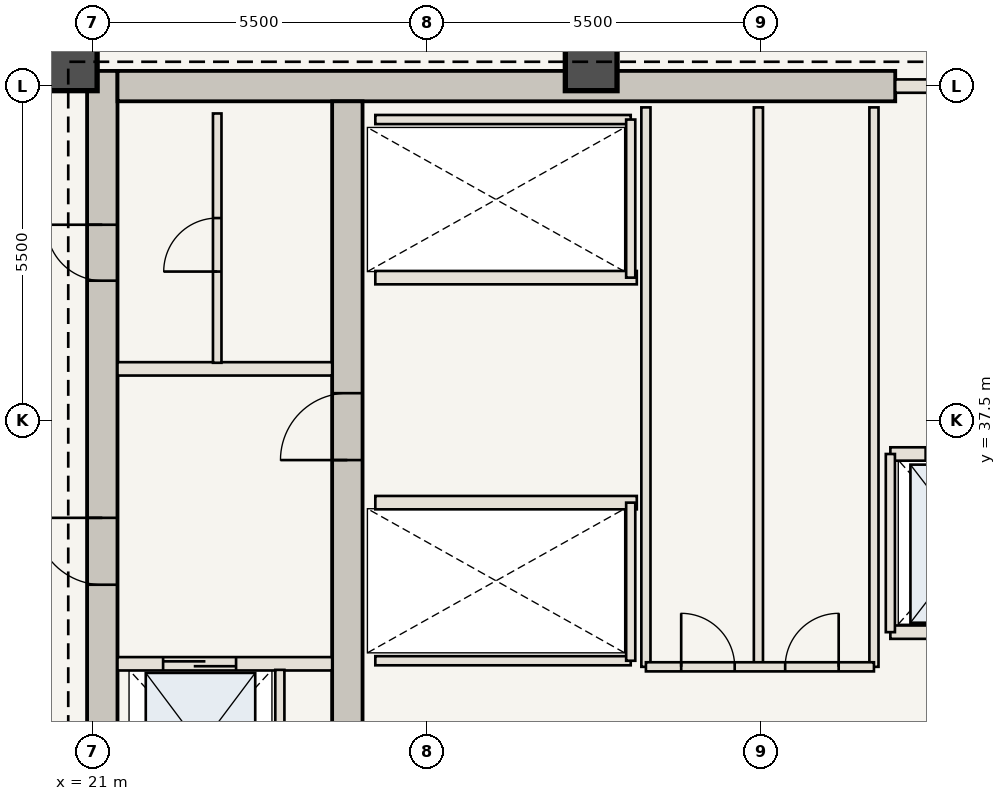
"""IFC4 building model, lengths in metres.
Left out: names, types, materials, properties, quantities, classifications, styles, units other than length and angle.
Written with IfcOpenShell. Run it as: python <this file> out.ifc"""

import sys

from ifc_helpers import new_model, si_unit, direction, frame, frame_2d, origin, origin_2d, place, context, subcontext, project, spatial, rectangle, extrude, element, fill, save


model = new_model("IFC4")
c1 = context("Model", 3, precision=1e-05, world=origin(), true_north=direction((0.0, 1.0)))
c2 = subcontext(c1, "Body", "Model", "MODEL_VIEW")
j1 = project(units=[si_unit("LENGTHUNIT", "METRE"), si_unit("PLANEANGLEUNIT", "RADIAN")], contexts=[c1])
p1 = place(None, origin())
s1 = spatial("IfcSite", under=j1, at=p1, CompositionType="ELEMENT")
p2 = place(p1, origin())
s2 = spatial("IfcBuilding", under=s1, at=p2, CompositionType="ELEMENT")
p3 = place(p2, frame((0.0, 0.0, 202.3)))
s3 = spatial("IfcBuildingStorey", under=s2, at=p3, CompositionType="ELEMENT", Elevation=202.3)
p4 = place(p3, frame((21.16, 30.6, 0.0), z_axis=(0.0, 0.0, 1.0), x_axis=(0.0, 1.0, 0.0)))
e1 = element("IfcWall", 1, at=p4, inside=s3, PredefinedType="SHEAR", context=c2, shape_type="SweptSolid", body=[
    extrude(rectangle(XDim=12.65, YDim=0.5, at=frame_2d((6.325, 0.0))), origin(), (0.0, 0.0, 1.0), 3.85),
])
p5 = place(p4, frame((4.2, 0.0, 0.0)))
e2 = element("IfcOpeningElement", 2, at=p5, cuts=e1, PredefinedType="OPENING", context=c2, shape_type="SweptSolid", body=[
    extrude(rectangle(XDim=1.1, YDim=2.15, at=frame_2d((0.55, 1.075))), frame((0.0, 0.26, 0.0), z_axis=(0.0, -1.0, 0.0), x_axis=(1.0, 0.0, 0.0)), (0.0, 0.0, 1.0), 0.52),
])
p6 = place(p4, frame((9.2, 0.0, 0.0)))
e3 = element("IfcOpeningElement", 3, at=p6, cuts=e1, PredefinedType="OPENING", context=c2, shape_type="SweptSolid", body=[
    extrude(rectangle(XDim=0.92, YDim=2.1, at=frame_2d((0.46, 1.05))), frame((0.0, 0.26, 0.0), z_axis=(0.0, -1.0, 0.0), x_axis=(1.0, 0.0, 0.0)), (0.0, 0.0, 1.0), 0.52),
])
p7 = place(p3, frame((21.41, 43.0, 0.0), z_axis=(0.0, 0.0, 1.0), x_axis=(1.0, 0.0, 0.0)))
e4 = element("IfcWall", 4, at=p7, inside=s3, PredefinedType="SHEAR", context=c2, shape_type="SweptSolid", body=[
    extrude(rectangle(XDim=12.79, YDim=0.5, at=frame_2d((6.395, 0.0))), origin(), (0.0, 0.0, 1.0), 3.85),
])
p8 = place(p3, frame((25.19, 30.6, 0.0), z_axis=(0.0, 0.0, 1.0), x_axis=(0.0, 1.0, 0.0)))
e5 = element("IfcWall", 5, at=p8, inside=s3, PredefinedType="SHEAR", context=c2, shape_type="SweptSolid", body=[
    extrude(rectangle(XDim=12.15, YDim=0.5, at=frame_2d((6.075, 0.0))), origin(), (0.0, 0.0, 1.0), 3.85),
])
p9 = place(p8, frame((6.25, 0.0, 0.0)))
e6 = element("IfcOpeningElement", 6, at=p9, cuts=e5, PredefinedType="OPENING", context=c2, shape_type="SweptSolid", body=[
    extrude(rectangle(XDim=1.1, YDim=2.15, at=frame_2d((0.55, 1.075))), frame((0.0, 0.26, 0.0), z_axis=(0.0, -1.0, 0.0), x_axis=(1.0, 0.0, 0.0)), (0.0, 0.0, 1.0), 0.52),
])
for number, where, z_axis, x_axis in (
    (7, (29.2, 43.35, 0.0), (0.0, 0.0, 1.0), (1.0, 0.0, 0.0)),
    (8, (20.65, 43.35, 0.0), (0.0, 0.0, 1.0), (1.0, 0.0, 0.0)),
):
    element("IfcColumn", number, at=place(p3, frame(where, z_axis=z_axis, x_axis=x_axis)), inside=s3, PredefinedType="COLUMN", context=c2, shape_type="SweptSolid", body=[
        extrude(rectangle(XDim=0.85, YDim=0.85, at=origin_2d()), origin(), (0.0, 0.0, 1.0), 3.85),
    ])
p10 = place(p3, frame((21.41, 33.5, 0.0), z_axis=(0.0, 0.0, 1.0), x_axis=(1.0, 0.0, 0.0)))
e9 = element("IfcWall", 9, at=p10, inside=s3, PredefinedType="STANDARD", context=c2, shape_type="SweptSolid", body=[
    extrude(rectangle(XDim=3.53, YDim=0.22, at=frame_2d((1.765, 0.0))), origin(), (0.0, 0.0, 1.0), 3.685),
])
p11 = place(p10, frame((0.75, 0.0, 0.0)))
e10 = element("IfcOpeningElement", 10, at=p11, cuts=e9, PredefinedType="OPENING", context=c2, shape_type="SweptSolid", body=[
    extrude(rectangle(XDim=1.2, YDim=2.2, at=frame_2d((0.6, 1.1))), frame((0.0, 0.12, 0.0), z_axis=(0.0, -1.0, 0.0), x_axis=(1.0, 0.0, 0.0)), (0.0, 0.0, 1.0), 0.24),
])
p12 = place(p3, frame((24.08, 30.75, 0.0), z_axis=(0.0, 0.0, 1.0), x_axis=(0.0, 1.0, 0.0)))
e11 = element("IfcWall", 11, at=p12, inside=s3, PredefinedType="STANDARD", context=c2, shape_type="SweptSolid", body=[
    extrude(rectangle(XDim=2.65, YDim=0.15, at=frame_2d((1.325, 0.0))), origin(), (0.0, 0.0, 1.0), 3.685),
])
p13 = place(p3, frame((21.41, 38.35, 0.0), z_axis=(0.0, 0.0, 1.0), x_axis=(1.0, 0.0, 0.0)))
e12 = element("IfcWall", 12, at=p13, inside=s3, PredefinedType="STANDARD", context=c2, shape_type="SweptSolid", body=[
    extrude(rectangle(XDim=3.53, YDim=0.22, at=frame_2d((1.765, 0.0))), origin(), (0.0, 0.0, 1.0), 3.685),
])
p14 = place(p3, frame((23.05, 38.45, 0.0), z_axis=(0.0, 0.0, 1.0), x_axis=(0.0, 1.0, 0.0)))
e13 = element("IfcWall", 13, at=p14, inside=s3, PredefinedType="STANDARD", context=c2, shape_type="SweptSolid", body=[
    extrude(rectangle(XDim=4.1, YDim=0.14, at=frame_2d((2.05, 0.0))), origin(), (0.0, 0.0, 1.0), 3.685),
])
p15 = place(p14, frame((1.5, 0.0, 0.0)))
e14 = element("IfcOpeningElement", 14, at=p15, cuts=e13, PredefinedType="OPENING", context=c2, shape_type="SweptSolid", body=[
    extrude(rectangle(XDim=0.88, YDim=2.1, at=frame_2d((0.44, 1.05))), frame((0.0, 0.08, 0.0), z_axis=(0.0, -1.0, 0.0), x_axis=(1.0, 0.0, 0.0)), (0.0, 0.0, 1.0), 0.16),
])
p16 = place(p3, frame((25.65, 36.15, 0.0), z_axis=(0.0, 0.0, 1.0), x_axis=(1.0, 0.0, 0.0)))
e15 = element("IfcWall", 15, at=p16, inside=s3, PredefinedType="STANDARD", context=c2, shape_type="SweptSolid", body=[
    extrude(rectangle(XDim=4.3, YDim=0.22, at=frame_2d((2.15, 0.0))), origin(), (0.0, 0.0, 1.0), 3.685),
])
p17 = place(p3, frame((25.65, 33.55, 0.0), z_axis=(0.0, 0.0, 1.0), x_axis=(1.0, 0.0, 0.0)))
e16 = element("IfcWall", 16, at=p17, inside=s3, PredefinedType="STANDARD", context=c2, shape_type="SweptSolid", body=[
    extrude(rectangle(XDim=4.2, YDim=0.15, at=frame_2d((2.1, 0.0))), origin(), (0.0, 0.0, 1.0), 3.685),
])
p18 = place(p3, frame((29.85, 33.55, 0.0), z_axis=(0.0, 0.0, 1.0), x_axis=(0.0, 1.0, 0.0)))
e17 = element("IfcWall", 17, at=p18, inside=s3, PredefinedType="STANDARD", context=c2, shape_type="SweptSolid", body=[
    extrude(rectangle(XDim=2.6, YDim=0.15, at=frame_2d((1.3, 0.0))), origin(), (0.0, 0.0, 1.0), 3.685),
])
p19 = place(p3, frame((25.65, 39.85, 0.0), z_axis=(0.0, 0.0, 1.0), x_axis=(1.0, 0.0, 0.0)))
e18 = element("IfcWall", 18, at=p19, inside=s3, PredefinedType="STANDARD", context=c2, shape_type="SweptSolid", body=[
    extrude(rectangle(XDim=4.3, YDim=0.22, at=frame_2d((2.15, 0.0))), origin(), (0.0, 0.0, 1.0), 3.685),
])
p20 = place(p3, frame((25.65, 42.45, 0.0), z_axis=(0.0, 0.0, 1.0), x_axis=(1.0, 0.0, 0.0)))
e19 = element("IfcWall", 19, at=p20, inside=s3, PredefinedType="STANDARD", context=c2, shape_type="SweptSolid", body=[
    extrude(rectangle(XDim=4.2, YDim=0.15, at=frame_2d((2.1, 0.0))), origin(), (0.0, 0.0, 1.0), 3.685),
])
p21 = place(p3, frame((29.85, 39.85, 0.0), z_axis=(0.0, 0.0, 1.0), x_axis=(0.0, 1.0, 0.0)))
e20 = element("IfcWall", 20, at=p21, inside=s3, PredefinedType="STANDARD", context=c2, shape_type="SweptSolid", body=[
    extrude(rectangle(XDim=2.6, YDim=0.15, at=frame_2d((1.3, 0.0))), origin(), (0.0, 0.0, 1.0), 3.685),
])
for number, where, z_axis, x_axis in (
    (21, (30.1, 33.45, 0.0), (0.0, 0.0, 1.0), (0.0, 1.0, 0.0)),
    (22, (31.95, 33.45, 0.0), (0.0, 0.0, 1.0), (0.0, 1.0, 0.0)),
    (23, (33.85, 33.45, 0.0), (0.0, 0.0, 1.0), (0.0, 1.0, 0.0)),
):
    element("IfcWall", number, at=place(p3, frame(where, z_axis=z_axis, x_axis=x_axis)), inside=s3, PredefinedType="STANDARD", context=c2, shape_type="SweptSolid", body=[
        extrude(rectangle(XDim=9.2, YDim=0.15, at=frame_2d((4.6, 0.0))), origin(), (0.0, 0.0, 1.0), 3.685),
    ])
p22 = place(p3, frame((30.1, 33.45, 0.0), z_axis=(0.0, 0.0, 1.0), x_axis=(1.0, 0.0, 0.0)))
e24 = element("IfcWall", 24, at=p22, inside=s3, PredefinedType="STANDARD", context=c2, shape_type="SweptSolid", body=[
    extrude(rectangle(XDim=3.75, YDim=0.15, at=frame_2d((1.875, 0.0))), origin(), (0.0, 0.0, 1.0), 3.685),
])
p23 = place(p22, frame((0.58, 0.0, 0.0)))
e25 = element("IfcOpeningElement", 25, at=p23, cuts=e24, PredefinedType="OPENING", context=c2, shape_type="SweptSolid", body=[
    extrude(rectangle(XDim=0.88, YDim=2.1, at=frame_2d((0.44, 1.05))), frame((0.0, 0.085, 0.0), z_axis=(0.0, -1.0, 0.0), x_axis=(1.0, 0.0, 0.0)), (0.0, 0.0, 1.0), 0.17),
])
p24 = place(p22, frame((2.29, 0.0, 0.0)))
e26 = element("IfcOpeningElement", 26, at=p24, cuts=e24, PredefinedType="OPENING", context=c2, shape_type="SweptSolid", body=[
    extrude(rectangle(XDim=0.88, YDim=2.1, at=frame_2d((0.44, 1.05))), frame((0.0, 0.085, 0.0), z_axis=(0.0, -1.0, 0.0), x_axis=(1.0, 0.0, 0.0)), (0.0, 0.0, 1.0), 0.17),
])
p25 = place(p3, frame((34.2, 43.0, 0.0), z_axis=(0.0, 0.0, 1.0), x_axis=(1.0, 0.0, 0.0)))
e27 = element("IfcWall", 27, at=p25, inside=s3, PredefinedType="STANDARD", context=c2, shape_type="SweptSolid", body=[
    extrude(rectangle(XDim=3.55, YDim=0.22, at=frame_2d((1.775, 0.0))), origin(), (0.0, 0.0, 1.0), 3.685),
])
p26 = place(p25, frame((1.4, 0.0, 0.0)))
e28 = element("IfcOpeningElement", 28, at=p26, cuts=e27, PredefinedType="OPENING", context=c2, shape_type="SweptSolid", body=[
    extrude(rectangle(XDim=1.1, YDim=2.15, at=frame_2d((0.55, 1.075))), frame((0.0, 0.12, 0.0), z_axis=(0.0, -1.0, 0.0), x_axis=(1.0, 0.0, 0.0)), (0.0, 0.0, 1.0), 0.24),
])
p27 = place(p3, frame((34.12, 36.95, 0.0), z_axis=(0.0, 0.0, 1.0), x_axis=(1.0, 0.0, 0.0)))
e29 = element("IfcWall", 29, at=p27, inside=s3, PredefinedType="STANDARD", context=c2, shape_type="SweptSolid", body=[
    extrude(rectangle(XDim=2.68, YDim=0.22, at=frame_2d((1.34, 0.0))), origin(), (0.0, 0.0, 1.0), 3.685),
])
p28 = place(p27, frame((0.58, 0.0, 0.0)))
e30 = element("IfcOpeningElement", 30, at=p28, cuts=e29, PredefinedType="OPENING", context=c2, shape_type="SweptSolid", body=[
    extrude(rectangle(XDim=1.2, YDim=2.2, at=frame_2d((0.6, 1.1))), frame((0.0, 0.12, 0.0), z_axis=(0.0, -1.0, 0.0), x_axis=(1.0, 0.0, 0.0)), (0.0, 0.0, 1.0), 0.24),
])
p29 = place(p3, frame((34.12, 34.02, 0.0), z_axis=(0.0, 0.0, 1.0), x_axis=(1.0, 0.0, 0.0)))
e31 = element("IfcWall", 31, at=p29, inside=s3, PredefinedType="STANDARD", context=c2, shape_type="SweptSolid", body=[
    extrude(rectangle(XDim=2.68, YDim=0.22, at=frame_2d((1.34, 0.0))), origin(), (0.0, 0.0, 1.0), 3.685),
])
p30 = place(p3, frame((34.12, 34.02, 0.0), z_axis=(0.0, 0.0, 1.0), x_axis=(0.0, 1.0, 0.0)))
e32 = element("IfcWall", 32, at=p30, inside=s3, PredefinedType="STANDARD", context=c2, shape_type="SweptSolid", body=[
    extrude(rectangle(XDim=2.93, YDim=0.15, at=frame_2d((1.465, 0.0))), origin(), (0.0, 0.0, 1.0), 3.685),
])
p31 = place(p5, origin())
e33 = element("IfcDoor", 33, at=p31, inside=s3, OperationType="SINGLE_SWING_RIGHT", PredefinedType="DOOR", context=c2, shape_type="SweptSolid", body=[
    extrude(rectangle(XDim=1.1, YDim=2.15, at=frame_2d((0.55, 1.075))), frame((0.0, 0.025, 0.0), z_axis=(0.0, -1.0, 0.0), x_axis=(1.0, 0.0, 0.0)), (0.0, 0.0, 1.0), 0.05),
])
fill(e2, e33)
p32 = place(p9, origin())
e34 = element("IfcDoor", 34, at=p32, inside=s3, OperationType="SINGLE_SWING_LEFT", PredefinedType="DOOR", context=c2, shape_type="SweptSolid", body=[
    extrude(rectangle(XDim=1.1, YDim=2.15, at=frame_2d((0.55, 1.075))), frame((0.0, 0.025, 0.0), z_axis=(0.0, -1.0, 0.0), x_axis=(1.0, 0.0, 0.0)), (0.0, 0.0, 1.0), 0.05),
])
fill(e6, e34)
p33 = place(p6, origin())
e35 = element("IfcDoor", 35, at=p33, inside=s3, OperationType="SINGLE_SWING_RIGHT", PredefinedType="DOOR", context=c2, shape_type="SweptSolid", body=[
    extrude(rectangle(XDim=0.92, YDim=2.1, at=frame_2d((0.46, 1.05))), frame((0.0, 0.025, 0.0), z_axis=(0.0, -1.0, 0.0), x_axis=(1.0, 0.0, 0.0)), (0.0, 0.0, 1.0), 0.05),
])
fill(e3, e35)
p34 = place(p11, origin())
e36 = element("IfcDoor", 36, at=p34, inside=s3, OperationType="DOUBLE_DOOR_SLIDING", PredefinedType="DOOR", context=c2, shape_type="SweptSolid", body=[
    extrude(rectangle(XDim=1.2, YDim=2.2, at=frame_2d((0.6, 1.1))), frame((0.0, 0.025, 0.0), z_axis=(0.0, -1.0, 0.0), x_axis=(1.0, 0.0, 0.0)), (0.0, 0.0, 1.0), 0.05),
])
fill(e10, e36)
p35 = place(p15, origin())
e37 = element("IfcDoor", 37, at=p35, inside=s3, OperationType="SINGLE_SWING_LEFT", PredefinedType="DOOR", context=c2, shape_type="SweptSolid", body=[
    extrude(rectangle(XDim=0.88, YDim=2.1, at=frame_2d((0.44, 1.05))), frame((0.0, 0.025, 0.0), z_axis=(0.0, -1.0, 0.0), x_axis=(1.0, 0.0, 0.0)), (0.0, 0.0, 1.0), 0.05),
])
fill(e14, e37)
p36 = place(p23, origin())
e38 = element("IfcDoor", 38, at=p36, inside=s3, OperationType="SINGLE_SWING_LEFT", PredefinedType="DOOR", context=c2, shape_type="SweptSolid", body=[
    extrude(rectangle(XDim=0.88, YDim=2.1, at=frame_2d((0.44, 1.05))), frame((0.0, 0.025, 0.0), z_axis=(0.0, -1.0, 0.0), x_axis=(1.0, 0.0, 0.0)), (0.0, 0.0, 1.0), 0.05),
])
fill(e25, e38)
p37 = place(p24, origin())
e39 = element("IfcDoor", 39, at=p37, inside=s3, OperationType="SINGLE_SWING_RIGHT", PredefinedType="DOOR", context=c2, shape_type="SweptSolid", body=[
    extrude(rectangle(XDim=0.88, YDim=2.1, at=frame_2d((0.44, 1.05))), frame((0.0, 0.025, 0.0), z_axis=(0.0, -1.0, 0.0), x_axis=(1.0, 0.0, 0.0)), (0.0, 0.0, 1.0), 0.05),
])
fill(e26, e39)
p38 = place(p28, origin())
e40 = element("IfcDoor", 40, at=p38, inside=s3, OperationType="DOUBLE_DOOR_SLIDING", PredefinedType="DOOR", context=c2, shape_type="SweptSolid", body=[
    extrude(rectangle(XDim=1.2, YDim=2.2, at=frame_2d((0.6, 1.1))), frame((0.0, 0.025, 0.0), z_axis=(0.0, -1.0, 0.0), x_axis=(1.0, 0.0, 0.0)), (0.0, 0.0, 1.0), 0.05),
])
fill(e30, e40)
save(model, sys.argv[1])
